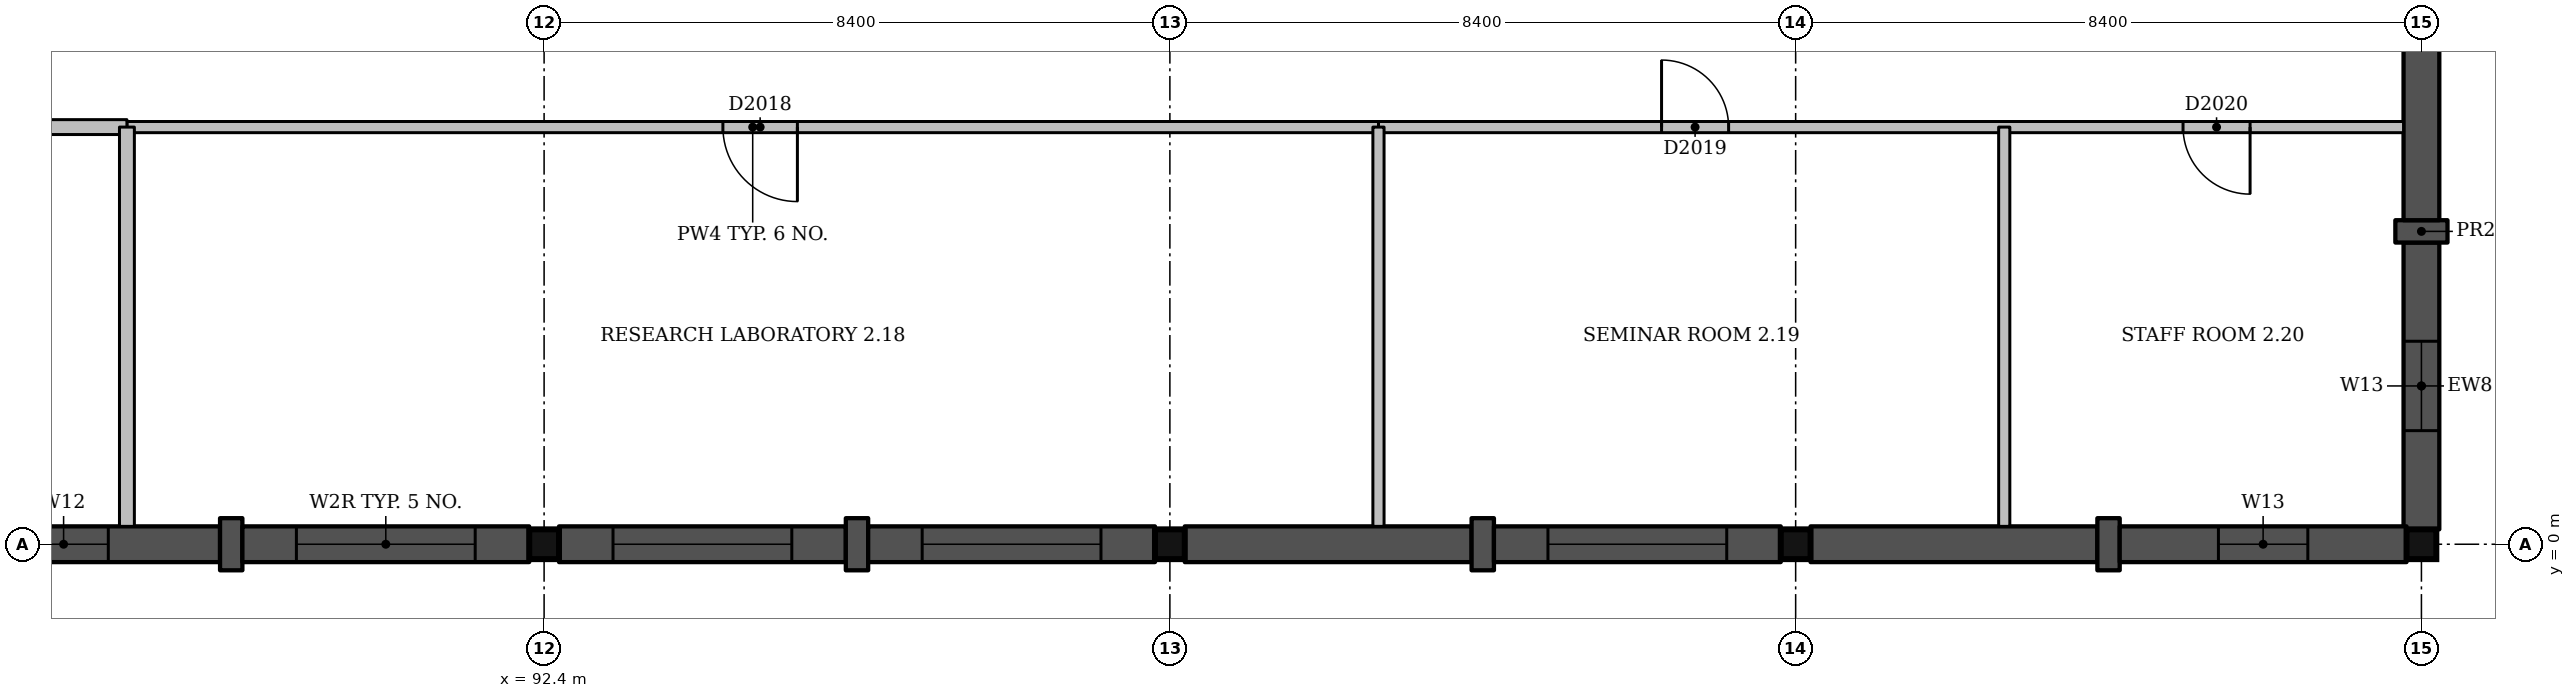
"""IFC4 building model, lengths in metres.
Left out: names, types, materials, properties, quantities, classifications, styles, units other than length and angle.
Written with IfcOpenShell. Run it as: python <this file> out.ifc"""

import sys

from ifc_helpers import new_model, si_unit, direction, frame, frame_2d, origin, origin_2d, place, context, subcontext, project, spatial, rectangle, extrude, element, fill, save


model = new_model("IFC4")
c1 = context("Model", 3, precision=1e-05, world=origin(), true_north=direction((0.0, 1.0)))
c2 = subcontext(c1, "Body", "Model", "MODEL_VIEW")
j1 = project(units=[si_unit("LENGTHUNIT", "METRE"), si_unit("PLANEANGLEUNIT", "RADIAN")], contexts=[c1])
p1 = place(None, origin())
s1 = spatial("IfcSite", under=j1, at=p1, CompositionType="ELEMENT")
p2 = place(p1, origin())
s2 = spatial("IfcBuilding", under=s1, at=p2, CompositionType="ELEMENT")
p3 = place(p2, frame((0.0, 0.0, 9.0)))
s3 = spatial("IfcBuildingStorey", under=s2, at=p3, CompositionType="ELEMENT", Elevation=9.0)
for number, where, z_axis, x_axis in (
    (1, (92.4, 0.0, 0.0), (0.0, 0.0, 1.0), (1.0, 0.0, 0.0)),
    (2, (100.8, 0.0, 0.0), (0.0, 0.0, 1.0), (1.0, 0.0, 0.0)),
    (3, (109.2, 0.0, 0.0), (0.0, 0.0, 1.0), (1.0, 0.0, 0.0)),
    (4, (117.6, 0.0, 0.0), (0.0, 0.0, 1.0), (1.0, 0.0, 0.0)),
):
    element("IfcColumn", number, at=place(p3, frame(where, z_axis=z_axis, x_axis=x_axis)), inside=s3, PredefinedType="COLUMN", context=c2, shape_type="SweptSolid", body=[
        extrude(rectangle(XDim=0.4, YDim=0.4, at=origin_2d()), origin(), (0.0, 0.0, 1.0), 4.5),
    ])
p4 = place(p3, frame((117.6, 0.2, 0.0), z_axis=(0.0, 0.0, 1.0), x_axis=(0.0, 1.0, 0.0)))
e5 = element("IfcWall", 5, at=p4, inside=s3, PredefinedType="SOLIDWALL", context=c2, shape_type="SweptSolid", body=[
    extrude(rectangle(XDim=3.85, YDim=0.48, at=frame_2d((1.925, 0.0))), origin(), (0.0, 0.0, 1.0), 3.6),
])
p5 = place(p4, frame((1.325, 0.0, 0.9)))
e6 = element("IfcOpeningElement", 6, at=p5, cuts=e5, PredefinedType="OPENING", context=c2, shape_type="SweptSolid", body=[
    extrude(rectangle(XDim=1.2, YDim=2.1, at=frame_2d((0.6, 1.05))), frame((0.0, 0.25, 0.0), z_axis=(0.0, -1.0, 0.0), x_axis=(1.0, 0.0, 0.0)), (0.0, 0.0, 1.0), 0.5),
])
p6 = place(p3, frame((117.6, 4.05, 0.0), z_axis=(0.0, 0.0, 1.0), x_axis=(0.0, 1.0, 0.0)))
e7 = element("IfcWall", 7, at=p6, inside=s3, PredefinedType="SOLIDWALL", context=c2, shape_type="SweptSolid", body=[
    extrude(rectangle(XDim=0.3, YDim=0.7, at=frame_2d((0.15, 0.0))), origin(), (0.0, 0.0, 1.0), 3.6),
])
p7 = place(p3, frame((117.6, 4.35, 0.0), z_axis=(0.0, 0.0, 1.0), x_axis=(0.0, 1.0, 0.0)))
e8 = element("IfcWall", 8, at=p7, inside=s3, PredefinedType="SOLIDWALL", context=c2, shape_type="SweptSolid", body=[
    extrude(rectangle(XDim=3.85, YDim=0.48, at=frame_2d((1.925, 0.0))), origin(), (0.0, 0.0, 1.0), 3.6),
])
p8 = place(p3, frame((84.2, 0.0, 0.0), z_axis=(0.0, 0.0, 1.0), x_axis=(1.0, 0.0, 0.0)))
e9 = element("IfcWall", 9, at=p8, inside=s3, PredefinedType="SOLIDWALL", context=c2, shape_type="SweptSolid", body=[
    extrude(rectangle(XDim=3.85, YDim=0.48, at=frame_2d((1.925, 0.0))), origin(), (0.0, 0.0, 1.0), 3.6),
])
p9 = place(p8, frame((1.15, 0.0, 2.4)))
e10 = element("IfcOpeningElement", 10, at=p9, cuts=e9, PredefinedType="OPENING", context=c2, shape_type="SweptSolid", body=[
    extrude(rectangle(XDim=1.2, YDim=0.6, at=frame_2d((0.6, 0.3))), frame((0.0, 0.25, 0.0), z_axis=(0.0, -1.0, 0.0), x_axis=(1.0, 0.0, 0.0)), (0.0, 0.0, 1.0), 0.5),
])
p10 = place(p3, frame((88.05, 0.0, 0.0), z_axis=(0.0, 0.0, 1.0), x_axis=(1.0, 0.0, 0.0)))
e11 = element("IfcWall", 11, at=p10, inside=s3, PredefinedType="SOLIDWALL", context=c2, shape_type="SweptSolid", body=[
    extrude(rectangle(XDim=0.3, YDim=0.7, at=frame_2d((0.15, 0.0))), origin(), (0.0, 0.0, 1.0), 3.6),
])
p11 = place(p3, frame((88.35, 0.0, 0.0), z_axis=(0.0, 0.0, 1.0), x_axis=(1.0, 0.0, 0.0)))
e12 = element("IfcWall", 12, at=p11, inside=s3, PredefinedType="SOLIDWALL", context=c2, shape_type="SweptSolid", body=[
    extrude(rectangle(XDim=3.85, YDim=0.48, at=frame_2d((1.925, 0.0))), origin(), (0.0, 0.0, 1.0), 3.6),
])
p12 = place(p11, frame((0.725, 0.0, 2.4)))
e13 = element("IfcOpeningElement", 13, at=p12, cuts=e12, PredefinedType="OPENING", context=c2, shape_type="SweptSolid", body=[
    extrude(rectangle(XDim=2.4, YDim=0.6, at=frame_2d((1.2, 0.3))), frame((0.0, 0.25, 0.0), z_axis=(0.0, -1.0, 0.0), x_axis=(1.0, 0.0, 0.0)), (0.0, 0.0, 1.0), 0.5),
])
p13 = place(p3, frame((92.6, 0.0, 0.0), z_axis=(0.0, 0.0, 1.0), x_axis=(1.0, 0.0, 0.0)))
e14 = element("IfcWall", 14, at=p13, inside=s3, PredefinedType="SOLIDWALL", context=c2, shape_type="SweptSolid", body=[
    extrude(rectangle(XDim=3.85, YDim=0.48, at=frame_2d((1.925, 0.0))), origin(), (0.0, 0.0, 1.0), 3.6),
])
p14 = place(p13, frame((0.725, 0.0, 2.4)))
e15 = element("IfcOpeningElement", 15, at=p14, cuts=e14, PredefinedType="OPENING", context=c2, shape_type="SweptSolid", body=[
    extrude(rectangle(XDim=2.4, YDim=0.6, at=frame_2d((1.2, 0.3))), frame((0.0, 0.25, 0.0), z_axis=(0.0, -1.0, 0.0), x_axis=(1.0, 0.0, 0.0)), (0.0, 0.0, 1.0), 0.5),
])
p15 = place(p3, frame((96.45, 0.0, 0.0), z_axis=(0.0, 0.0, 1.0), x_axis=(1.0, 0.0, 0.0)))
e16 = element("IfcWall", 16, at=p15, inside=s3, PredefinedType="SOLIDWALL", context=c2, shape_type="SweptSolid", body=[
    extrude(rectangle(XDim=0.3, YDim=0.7, at=frame_2d((0.15, 0.0))), origin(), (0.0, 0.0, 1.0), 3.6),
])
p16 = place(p3, frame((96.75, 0.0, 0.0), z_axis=(0.0, 0.0, 1.0), x_axis=(1.0, 0.0, 0.0)))
e17 = element("IfcWall", 17, at=p16, inside=s3, PredefinedType="SOLIDWALL", context=c2, shape_type="SweptSolid", body=[
    extrude(rectangle(XDim=3.85, YDim=0.48, at=frame_2d((1.925, 0.0))), origin(), (0.0, 0.0, 1.0), 3.6),
])
p17 = place(p16, frame((0.725, 0.0, 2.4)))
e18 = element("IfcOpeningElement", 18, at=p17, cuts=e17, PredefinedType="OPENING", context=c2, shape_type="SweptSolid", body=[
    extrude(rectangle(XDim=2.4, YDim=0.6, at=frame_2d((1.2, 0.3))), frame((0.0, 0.25, 0.0), z_axis=(0.0, -1.0, 0.0), x_axis=(1.0, 0.0, 0.0)), (0.0, 0.0, 1.0), 0.5),
])
p18 = place(p3, frame((101.0, 0.0, 0.0), z_axis=(0.0, 0.0, 1.0), x_axis=(1.0, 0.0, 0.0)))
e19 = element("IfcWall", 19, at=p18, inside=s3, PredefinedType="SOLIDWALL", context=c2, shape_type="SweptSolid", body=[
    extrude(rectangle(XDim=3.85, YDim=0.48, at=frame_2d((1.925, 0.0))), origin(), (0.0, 0.0, 1.0), 3.6),
])
p19 = place(p3, frame((104.85, 0.0, 0.0), z_axis=(0.0, 0.0, 1.0), x_axis=(1.0, 0.0, 0.0)))
e20 = element("IfcWall", 20, at=p19, inside=s3, PredefinedType="SOLIDWALL", context=c2, shape_type="SweptSolid", body=[
    extrude(rectangle(XDim=0.3, YDim=0.7, at=frame_2d((0.15, 0.0))), origin(), (0.0, 0.0, 1.0), 3.6),
])
p20 = place(p3, frame((105.15, 0.0, 0.0), z_axis=(0.0, 0.0, 1.0), x_axis=(1.0, 0.0, 0.0)))
e21 = element("IfcWall", 21, at=p20, inside=s3, PredefinedType="SOLIDWALL", context=c2, shape_type="SweptSolid", body=[
    extrude(rectangle(XDim=3.85, YDim=0.48, at=frame_2d((1.925, 0.0))), origin(), (0.0, 0.0, 1.0), 3.6),
])
p21 = place(p20, frame((0.725, 0.0, 2.4)))
e22 = element("IfcOpeningElement", 22, at=p21, cuts=e21, PredefinedType="OPENING", context=c2, shape_type="SweptSolid", body=[
    extrude(rectangle(XDim=2.4, YDim=0.6, at=frame_2d((1.2, 0.3))), frame((0.0, 0.25, 0.0), z_axis=(0.0, -1.0, 0.0), x_axis=(1.0, 0.0, 0.0)), (0.0, 0.0, 1.0), 0.5),
])
p22 = place(p3, frame((109.4, 0.0, 0.0), z_axis=(0.0, 0.0, 1.0), x_axis=(1.0, 0.0, 0.0)))
e23 = element("IfcWall", 23, at=p22, inside=s3, PredefinedType="SOLIDWALL", context=c2, shape_type="SweptSolid", body=[
    extrude(rectangle(XDim=3.85, YDim=0.48, at=frame_2d((1.925, 0.0))), origin(), (0.0, 0.0, 1.0), 3.6),
])
p23 = place(p3, frame((113.25, 0.0, 0.0), z_axis=(0.0, 0.0, 1.0), x_axis=(1.0, 0.0, 0.0)))
e24 = element("IfcWall", 24, at=p23, inside=s3, PredefinedType="SOLIDWALL", context=c2, shape_type="SweptSolid", body=[
    extrude(rectangle(XDim=0.3, YDim=0.7, at=frame_2d((0.15, 0.0))), origin(), (0.0, 0.0, 1.0), 3.6),
])
p24 = place(p3, frame((113.55, 0.0, 0.0), z_axis=(0.0, 0.0, 1.0), x_axis=(1.0, 0.0, 0.0)))
e25 = element("IfcWall", 25, at=p24, inside=s3, PredefinedType="SOLIDWALL", context=c2, shape_type="SweptSolid", body=[
    extrude(rectangle(XDim=3.85, YDim=0.48, at=frame_2d((1.925, 0.0))), origin(), (0.0, 0.0, 1.0), 3.6),
])
p25 = place(p24, frame((1.325, 0.0, 0.9)))
e26 = element("IfcOpeningElement", 26, at=p25, cuts=e25, PredefinedType="OPENING", context=c2, shape_type="SweptSolid", body=[
    extrude(rectangle(XDim=1.2, YDim=2.1, at=frame_2d((0.6, 1.05))), frame((0.0, 0.25, 0.0), z_axis=(0.0, -1.0, 0.0), x_axis=(1.0, 0.0, 0.0)), (0.0, 0.0, 1.0), 0.5),
])
p26 = place(p3, frame((103.6, 5.6, 0.0), z_axis=(0.0, 0.0, 1.0), x_axis=(1.0, 0.0, 0.0)))
e27 = element("IfcWall", 27, at=p26, inside=s3, PredefinedType="PARTITIONING", context=c2, shape_type="SweptSolid", body=[
    extrude(rectangle(XDim=13.76, YDim=0.15, at=frame_2d((6.88, 0.0))), origin(), (0.0, 0.0, 1.0), 3.6),
])
p27 = place(p26, frame((3.8, 0.0, 0.0)))
e28 = element("IfcOpeningElement", 28, at=p27, cuts=e27, PredefinedType="OPENING", context=c2, shape_type="SweptSolid", body=[
    extrude(rectangle(XDim=0.9, YDim=2.1, at=frame_2d((0.45, 1.05))), frame((0.0, 0.085, 0.0), z_axis=(0.0, -1.0, 0.0), x_axis=(1.0, 0.0, 0.0)), (0.0, 0.0, 1.0), 0.17),
])
p28 = place(p26, frame((10.8, 0.0, 0.0)))
e29 = element("IfcOpeningElement", 29, at=p28, cuts=e27, PredefinedType="OPENING", context=c2, shape_type="SweptSolid", body=[
    extrude(rectangle(XDim=0.9, YDim=2.1, at=frame_2d((0.45, 1.05))), frame((0.0, 0.085, 0.0), z_axis=(0.0, -1.0, 0.0), x_axis=(1.0, 0.0, 0.0)), (0.0, 0.0, 1.0), 0.17),
])
p29 = place(p3, frame((86.8, 5.6, 0.0), z_axis=(0.0, 0.0, 1.0), x_axis=(1.0, 0.0, 0.0)))
e30 = element("IfcWall", 30, at=p29, inside=s3, PredefinedType="PARTITIONING", context=c2, shape_type="SweptSolid", body=[
    extrude(rectangle(XDim=16.8, YDim=0.15, at=frame_2d((8.4, 0.0))), origin(), (0.0, 0.0, 1.0), 3.6),
])
p30 = place(p29, frame((8.0, 0.0, 0.0)))
e31 = element("IfcOpeningElement", 31, at=p30, cuts=e30, PredefinedType="OPENING", context=c2, shape_type="SweptSolid", body=[
    extrude(rectangle(XDim=1.0, YDim=2.1, at=frame_2d((0.5, 1.05))), frame((0.0, 0.085, 0.0), z_axis=(0.0, -1.0, 0.0), x_axis=(1.0, 0.0, 0.0)), (0.0, 0.0, 1.0), 0.17),
])
p31 = place(p3, frame((81.2, 5.6, 0.0), z_axis=(0.0, 0.0, 1.0), x_axis=(1.0, 0.0, 0.0)))
e32 = element("IfcWall", 32, at=p31, inside=s3, PredefinedType="PARTITIONING", context=c2, shape_type="SweptSolid", body=[
    extrude(rectangle(XDim=5.6, YDim=0.2, at=frame_2d((2.8, 0.0))), origin(), (0.0, 0.0, 1.0), 3.6),
])
p32 = place(p31, frame((2.4, 0.0, 0.0)))
e33 = element("IfcOpeningElement", 33, at=p32, cuts=e32, PredefinedType="OPENING", context=c2, shape_type="SweptSolid", body=[
    extrude(rectangle(XDim=1.0, YDim=2.1, at=frame_2d((0.5, 1.05))), frame((0.0, 0.11, 0.0), z_axis=(0.0, -1.0, 0.0), x_axis=(1.0, 0.0, 0.0)), (0.0, 0.0, 1.0), 0.22),
])
p33 = place(p3, frame((86.8, 0.24, 0.0), z_axis=(0.0, 0.0, 1.0), x_axis=(0.0, 1.0, 0.0)))
e34 = element("IfcWall", 34, at=p33, inside=s3, PredefinedType="PARTITIONING", context=c2, shape_type="SweptSolid", body=[
    extrude(rectangle(XDim=5.36, YDim=0.2, at=frame_2d((2.68, 0.0))), origin(), (0.0, 0.0, 1.0), 4.15),
])
for number, where, z_axis, x_axis in (
    (35, (103.6, 0.24, 0.0), (0.0, 0.0, 1.0), (0.0, 1.0, 0.0)),
    (36, (112.0, 0.24, 0.0), (0.0, 0.0, 1.0), (0.0, 1.0, 0.0)),
):
    element("IfcWall", number, at=place(p3, frame(where, z_axis=z_axis, x_axis=x_axis)), inside=s3, PredefinedType="PARTITIONING", context=c2, shape_type="SweptSolid", body=[
        extrude(rectangle(XDim=5.36, YDim=0.15, at=frame_2d((2.68, 0.0))), origin(), (0.0, 0.0, 1.0), 4.15),
    ])
p34 = place(p5, origin())
e37 = element("IfcWindow", 37, at=p34, inside=s3, PartitioningType="SINGLE_PANEL", PredefinedType="WINDOW", context=c2, shape_type="SweptSolid", body=[
    extrude(rectangle(XDim=1.2, YDim=2.1, at=frame_2d((0.6, 1.05))), frame((0.0, 0.12, 0.0), z_axis=(0.0, -1.0, 0.0), x_axis=(1.0, 0.0, 0.0)), (0.0, 0.0, 1.0), 0.06),
])
fill(e6, e37)
p35 = place(p9, origin())
e38 = element("IfcWindow", 38, at=p35, inside=s3, PartitioningType="SINGLE_PANEL", PredefinedType="WINDOW", context=c2, shape_type="SweptSolid", body=[
    extrude(rectangle(XDim=1.2, YDim=0.6, at=frame_2d((0.6, 0.3))), frame((0.0, 0.12, 0.0), z_axis=(0.0, -1.0, 0.0), x_axis=(1.0, 0.0, 0.0)), (0.0, 0.0, 1.0), 0.06),
])
fill(e10, e38)
p36 = place(p12, origin())
e39 = element("IfcWindow", 39, at=p36, inside=s3, PartitioningType="SINGLE_PANEL", PredefinedType="WINDOW", context=c2, shape_type="SweptSolid", body=[
    extrude(rectangle(XDim=2.4, YDim=0.6, at=frame_2d((1.2, 0.3))), frame((0.0, 0.12, 0.0), z_axis=(0.0, -1.0, 0.0), x_axis=(1.0, 0.0, 0.0)), (0.0, 0.0, 1.0), 0.06),
])
fill(e13, e39)
p37 = place(p14, origin())
e40 = element("IfcWindow", 40, at=p37, inside=s3, PartitioningType="SINGLE_PANEL", PredefinedType="WINDOW", context=c2, shape_type="SweptSolid", body=[
    extrude(rectangle(XDim=2.4, YDim=0.6, at=frame_2d((1.2, 0.3))), frame((0.0, 0.12, 0.0), z_axis=(0.0, -1.0, 0.0), x_axis=(1.0, 0.0, 0.0)), (0.0, 0.0, 1.0), 0.06),
])
fill(e15, e40)
p38 = place(p17, origin())
e41 = element("IfcWindow", 41, at=p38, inside=s3, PartitioningType="SINGLE_PANEL", PredefinedType="WINDOW", context=c2, shape_type="SweptSolid", body=[
    extrude(rectangle(XDim=2.4, YDim=0.6, at=frame_2d((1.2, 0.3))), frame((0.0, 0.12, 0.0), z_axis=(0.0, -1.0, 0.0), x_axis=(1.0, 0.0, 0.0)), (0.0, 0.0, 1.0), 0.06),
])
fill(e18, e41)
p39 = place(p21, origin())
e42 = element("IfcWindow", 42, at=p39, inside=s3, PartitioningType="SINGLE_PANEL", PredefinedType="WINDOW", context=c2, shape_type="SweptSolid", body=[
    extrude(rectangle(XDim=2.4, YDim=0.6, at=frame_2d((1.2, 0.3))), frame((0.0, 0.12, 0.0), z_axis=(0.0, -1.0, 0.0), x_axis=(1.0, 0.0, 0.0)), (0.0, 0.0, 1.0), 0.06),
])
fill(e22, e42)
p40 = place(p25, origin())
e43 = element("IfcWindow", 43, at=p40, inside=s3, PartitioningType="SINGLE_PANEL", PredefinedType="WINDOW", context=c2, shape_type="SweptSolid", body=[
    extrude(rectangle(XDim=1.2, YDim=2.1, at=frame_2d((0.6, 1.05))), frame((0.0, 0.12, 0.0), z_axis=(0.0, -1.0, 0.0), x_axis=(1.0, 0.0, 0.0)), (0.0, 0.0, 1.0), 0.06),
])
fill(e26, e43)
p41 = place(p30, origin())
e44 = element("IfcDoor", 44, at=p41, inside=s3, OperationType="SINGLE_SWING_RIGHT", PredefinedType="DOOR", context=c2, shape_type="SweptSolid", body=[
    extrude(rectangle(XDim=1.0, YDim=2.1, at=frame_2d((0.5, 1.05))), frame((0.0, 0.025, 0.0), z_axis=(0.0, -1.0, 0.0), x_axis=(1.0, 0.0, 0.0)), (0.0, 0.0, 1.0), 0.05),
])
fill(e31, e44)
p42 = place(p27, origin())
e45 = element("IfcDoor", 45, at=p42, inside=s3, OperationType="SINGLE_SWING_LEFT", PredefinedType="DOOR", context=c2, shape_type="SweptSolid", body=[
    extrude(rectangle(XDim=0.9, YDim=2.1, at=frame_2d((0.45, 1.05))), frame((0.0, 0.025, 0.0), z_axis=(0.0, -1.0, 0.0), x_axis=(1.0, 0.0, 0.0)), (0.0, 0.0, 1.0), 0.05),
])
fill(e28, e45)
p43 = place(p28, origin())
e46 = element("IfcDoor", 46, at=p43, inside=s3, OperationType="SINGLE_SWING_RIGHT", PredefinedType="DOOR", context=c2, shape_type="SweptSolid", body=[
    extrude(rectangle(XDim=0.9, YDim=2.1, at=frame_2d((0.45, 1.05))), frame((0.0, 0.025, 0.0), z_axis=(0.0, -1.0, 0.0), x_axis=(1.0, 0.0, 0.0)), (0.0, 0.0, 1.0), 0.05),
])
fill(e29, e46)
save(model, sys.argv[1])
